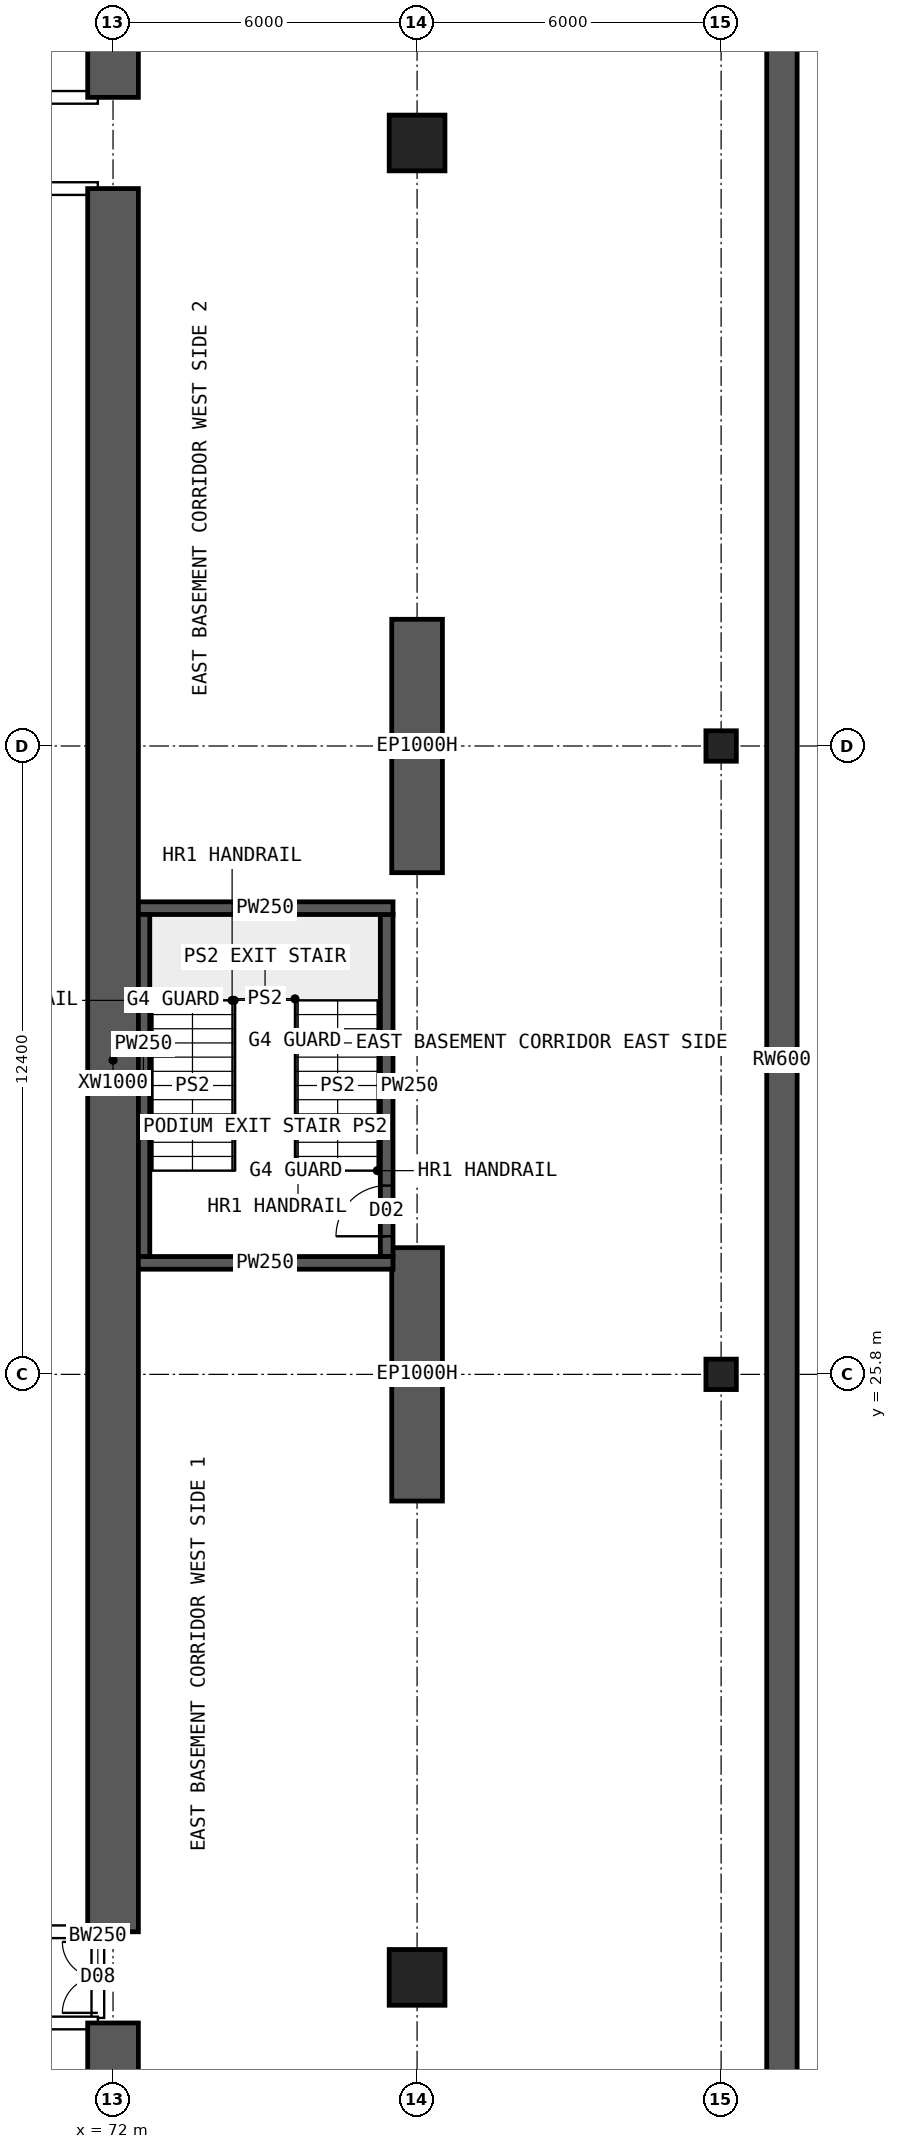
"""IFC4 building model, lengths in metres.
Left out: names, types, materials, properties, quantities, classifications, styles, units other than length and angle.
Written with IfcOpenShell. Run it as: python <this file> out.ifc"""

import sys

from ifc_helpers import new_model, si_unit, direction, frame, frame_2d, origin, origin_2d, place, context, subcontext, project, spatial, polyline, rectangle, hollow_rectangle, outline, extrude, element, fill, save


model = new_model("IFC4")
c1 = context("Model", 3, precision=1e-05, world=origin(), true_north=direction((0.0, 1.0)))
c2 = subcontext(c1, "Body", "Model", "MODEL_VIEW")
j1 = project(units=[si_unit("LENGTHUNIT", "METRE"), si_unit("PLANEANGLEUNIT", "RADIAN")], contexts=[c1])
p1 = place(None, origin())
s1 = spatial("IfcSite", under=j1, at=p1, CompositionType="ELEMENT")
p2 = place(p1, origin())
s2 = spatial("IfcBuilding", under=s1, at=p2, CompositionType="ELEMENT")
p3 = place(p2, frame((0.0, 0.0, -9.0)))
s3 = spatial("IfcBuildingStorey", under=s2, at=p3, CompositionType="ELEMENT", Elevation=-9.0)
for number, where, z_axis, x_axis in (
    (1, (78.0, 23.3, 0.0), (0.0, 0.0, 1.0), (0.0, 1.0, 0.0)),
    (2, (78.0, 35.7, 0.0), (0.0, 0.0, 1.0), (0.0, 1.0, 0.0)),
):
    element("IfcWall", number, at=place(p3, frame(where, z_axis=z_axis, x_axis=x_axis)), inside=s3, PredefinedType="SHEAR", context=c2, shape_type="SweptSolid", body=[
        extrude(rectangle(XDim=5.0, YDim=1.0, at=frame_2d((2.5, 0.0))), origin(), (0.0, 0.0, 1.0), 4.5),
    ])
for number, where, z_axis, x_axis in (
    (3, (78.0, 13.9, -0.5), (0.0, 0.0, 1.0), (1.0, 0.0, 0.0)),
    (4, (78.0, 50.1, -0.5), (0.0, 0.0, 1.0), (1.0, 0.0, 0.0)),
):
    element("IfcColumn", number, at=place(p3, frame(where, z_axis=z_axis, x_axis=x_axis)), inside=s3, PredefinedType="COLUMN", context=c2, shape_type="SweptSolid", body=[
        extrude(hollow_rectangle(XDim=1.1, YDim=1.1, WallThickness=0.11, at=origin_2d()), origin(), (0.0, 0.0, 1.0), 5.0),
    ])
for number, where, z_axis, x_axis in (
    (5, (84.0, 25.8, -0.5), (0.0, 0.0, 1.0), (1.0, 0.0, 0.0)),
    (6, (84.0, 38.2, -0.5), (0.0, 0.0, 1.0), (1.0, 0.0, 0.0)),
):
    element("IfcColumn", number, at=place(p3, frame(where, z_axis=z_axis, x_axis=x_axis)), inside=s3, PredefinedType="COLUMN", context=c2, shape_type="SweptSolid", body=[
        extrude(hollow_rectangle(XDim=0.6, YDim=0.6, WallThickness=0.06, at=origin_2d()), origin(), (0.0, 0.0, 1.0), 5.0),
    ])
p4 = place(p3, frame((72.475, 28.0, 0.0), z_axis=(0.0, 0.0, 1.0), x_axis=(1.0, 0.0, 0.0)))
e7 = element("IfcWall", 7, at=p4, inside=s3, PredefinedType="SHEAR", context=c2, shape_type="SweptSolid", body=[
    extrude(rectangle(XDim=5.05, YDim=0.25, at=frame_2d((2.525, 0.0))), origin(), (0.0, 0.0, 1.0), 4.5),
])
p5 = place(p3, frame((77.4, 28.125, 0.0), z_axis=(0.0, 0.0, 1.0), x_axis=(0.0, 1.0, 0.0)))
e8 = element("IfcWall", 8, at=p5, inside=s3, PredefinedType="SHEAR", context=c2, shape_type="SweptSolid", body=[
    extrude(rectangle(XDim=6.75, YDim=0.25, at=frame_2d((3.375, 0.0))), origin(), (0.0, 0.0, 1.0), 4.5),
])
p6 = place(p5, frame((0.4, 0.0, 0.0)))
e9 = element("IfcOpeningElement", 9, at=p6, cuts=e8, PredefinedType="OPENING", context=c2, shape_type="SweptSolid", body=[
    extrude(rectangle(XDim=1.0, YDim=2.1, at=frame_2d((0.5, 1.05))), frame((0.0, 0.135, 0.0), z_axis=(0.0, -1.0, 0.0), x_axis=(1.0, 0.0, 0.0)), (0.0, 0.0, 1.0), 0.27),
])
p7 = place(p3, frame((77.525, 35.0, 0.0), z_axis=(0.0, 0.0, 1.0), x_axis=(-1.0, 0.0, 0.0)))
e10 = element("IfcWall", 10, at=p7, inside=s3, PredefinedType="SHEAR", context=c2, shape_type="SweptSolid", body=[
    extrude(rectangle(XDim=5.05, YDim=0.25, at=frame_2d((2.525, 0.0))), origin(), (0.0, 0.0, 1.0), 4.5),
])
p8 = place(p3, frame((72.6, 34.875, 0.0), z_axis=(0.0, 0.0, 1.0), x_axis=(0.0, -1.0, 0.0)))
e11 = element("IfcWall", 11, at=p8, inside=s3, PredefinedType="SHEAR", context=c2, shape_type="SweptSolid", body=[
    extrude(rectangle(XDim=6.75, YDim=0.25, at=frame_2d((3.375, 0.0))), origin(), (0.0, 0.0, 1.0), 4.5),
])
for number, where, z_axis, x_axis in (
    (12, (72.0, 7.7, 0.0), (0.0, 0.0, 1.0), (0.0, 1.0, 0.0)),
    (13, (72.0, 51.0, 0.0), (0.0, 0.0, 1.0), (0.0, 1.0, 0.0)),
):
    element("IfcWall", number, at=place(p3, frame(where, z_axis=z_axis, x_axis=x_axis)), inside=s3, PredefinedType="SHEAR", context=c2, shape_type="SweptSolid", body=[
        extrude(rectangle(XDim=5.3, YDim=1.0, at=frame_2d((2.65, 0.0))), origin(), (0.0, 0.0, 1.0), 4.5),
    ])
p9 = place(p3, frame((72.0, 14.8, 0.0), z_axis=(0.0, 0.0, 1.0), x_axis=(0.0, 1.0, 0.0)))
e14 = element("IfcWall", 14, at=p9, inside=s3, PredefinedType="SHEAR", context=c2, shape_type="SweptSolid", body=[
    extrude(rectangle(XDim=34.4, YDim=1.0, at=frame_2d((17.2, 0.0))), origin(), (0.0, 0.0, 1.0), 4.5),
])
p10 = place(p3, frame((85.2, 4.53, 0.0), z_axis=(0.0, 0.0, 1.0), x_axis=(0.0, 1.0, 0.0)))
e15 = element("IfcWall", 15, at=p10, inside=s3, PredefinedType="SOLIDWALL", context=c2, shape_type="SweptSolid", body=[
    extrude(outline(polyline([(-0.03, -0.3), (54.97, -0.3), (54.911, 0.3), (0.03, 0.3), (-0.03, -0.3)])), origin(), (0.0, 0.0, 1.0), 4.5),
])
for number, where, z_axis, x_axis in (
    (16, (66.5, 13.0, 0.0), (0.0, 0.0, 1.0), (1.0, 0.0, 0.0)),
    (17, (66.5, 51.0, 0.0), (0.0, 0.0, 1.0), (1.0, 0.0, 0.0)),
):
    element("IfcWall", number, at=place(p3, frame(where, z_axis=z_axis, x_axis=x_axis)), inside=s3, PredefinedType="SOLIDWALL", context=c2, shape_type="SweptSolid", body=[
        extrude(rectangle(XDim=5.2, YDim=0.25, at=frame_2d((2.6, 0.0))), origin(), (0.0, 0.0, 1.0), 4.2),
    ])
for number, where, z_axis, x_axis in (
    (18, (68.4, 14.8, 0.0), (0.0, 0.0, 1.0), (1.0, 0.0, 0.0)),
    (19, (68.4, 49.2, 0.0), (0.0, 0.0, 1.0), (1.0, 0.0, 0.0)),
):
    element("IfcWall", number, at=place(p3, frame(where, z_axis=z_axis, x_axis=x_axis)), inside=s3, PredefinedType="SOLIDWALL", context=c2, shape_type="SweptSolid", body=[
        extrude(rectangle(XDim=3.3, YDim=0.25, at=frame_2d((1.65, 0.0))), origin(), (0.0, 0.0, 1.0), 4.2),
    ])
p11 = place(p3, frame((71.7, 13.1, 0.0), z_axis=(0.0, 0.0, 1.0), x_axis=(0.0, 1.0, 0.0)))
e20 = element("IfcWall", 20, at=p11, inside=s3, PredefinedType="SOLIDWALL", context=c2, shape_type="SweptSolid", body=[
    extrude(rectangle(XDim=1.6, YDim=0.25, at=frame_2d((0.8, 0.0))), origin(), (0.0, 0.0, 1.0), 4.2),
])
p12 = place(p11, frame((0.1, 0.0, 0.0)))
e21 = element("IfcOpeningElement", 21, at=p12, cuts=e20, PredefinedType="OPENING", context=c2, shape_type="SweptSolid", body=[
    extrude(rectangle(XDim=1.4, YDim=2.1, at=frame_2d((0.7, 1.05))), frame((0.0, 0.135, 0.0), z_axis=(0.0, -1.0, 0.0), x_axis=(1.0, 0.0, 0.0)), (0.0, 0.0, 1.0), 0.27),
])
p13 = place(p6, origin())
e22 = element("IfcDoor", 22, at=p13, inside=s3, OperationType="SINGLE_SWING_LEFT", PredefinedType="DOOR", context=c2, shape_type="SweptSolid", body=[
    extrude(rectangle(XDim=1.0, YDim=2.1, at=frame_2d((0.5, 1.05))), frame((0.0, 0.025, 0.0), z_axis=(0.0, -1.0, 0.0), x_axis=(1.0, 0.0, 0.0)), (0.0, 0.0, 1.0), 0.05),
])
fill(e9, e22)
p14 = place(p12, origin())
e23 = element("IfcDoor", 23, at=p14, inside=s3, OperationType="DOUBLE_DOOR_SINGLE_SWING", PredefinedType="DOOR", context=c2, shape_type="SweptSolid", body=[
    extrude(rectangle(XDim=1.4, YDim=2.1, at=frame_2d((0.7, 1.05))), frame((0.0, 0.025, 0.0), z_axis=(0.0, -1.0, 0.0), x_axis=(1.0, 0.0, 0.0)), (0.0, 0.0, 1.0), 0.05),
])
fill(e21, e23)
save(model, sys.argv[1])
